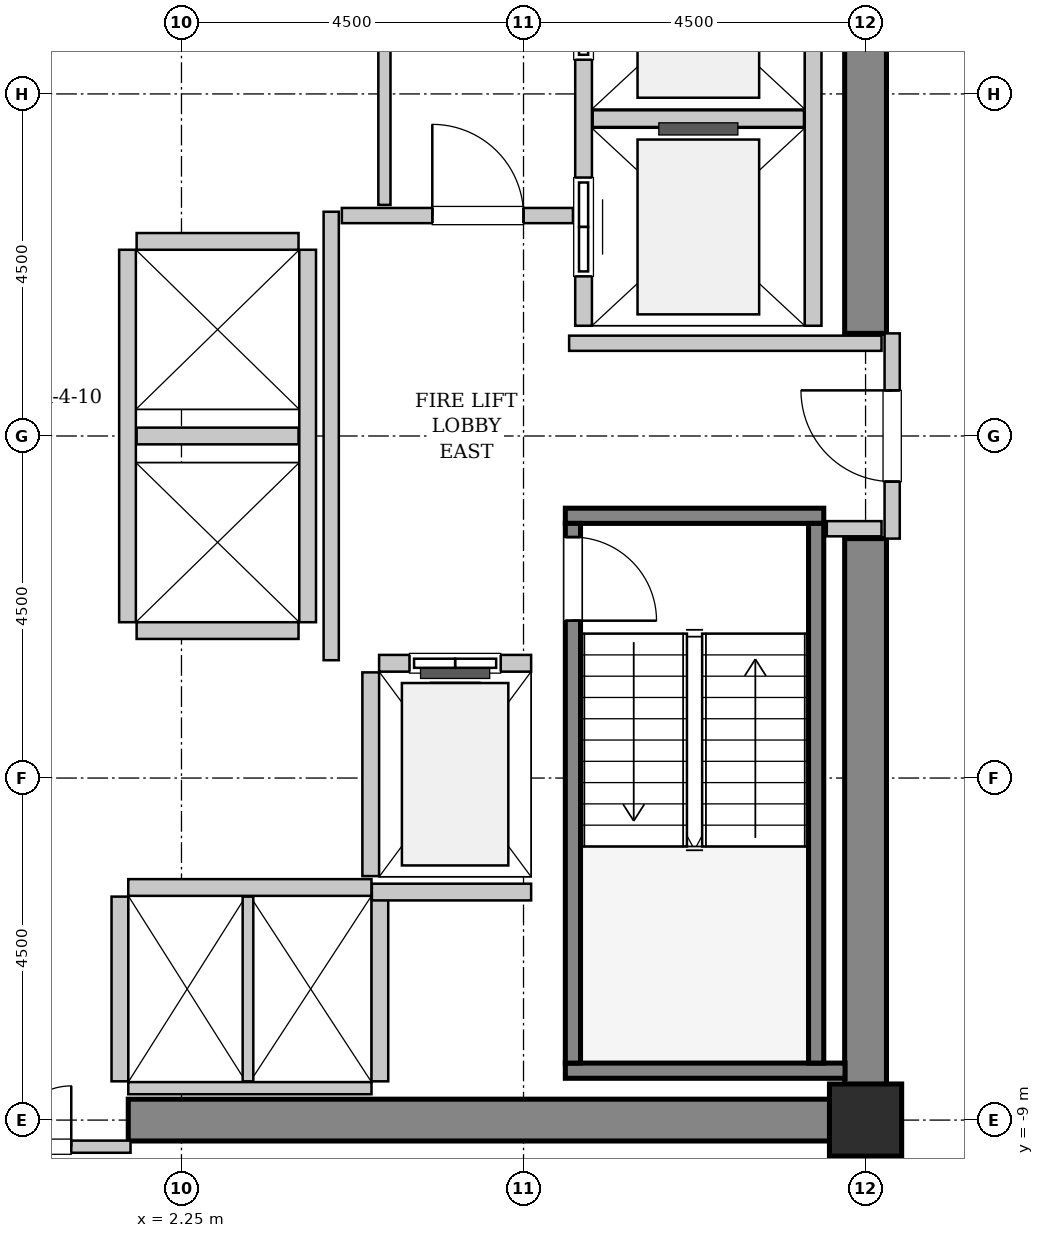
"""IFC4 building model, lengths in metres.
Left out: names, types, materials, properties, quantities, classifications, styles, units other than length and angle.
Written with IfcOpenShell. Run it as: python <this file> out.ifc"""

import sys

from ifc_helpers import new_model, si_unit, direction, frame, frame_2d, origin, origin_2d, place, context, subcontext, project, spatial, rectangle, hollow_rectangle, extrude, source, transform, mapped, element, fill, save


model = new_model("IFC4")
c1 = context("Model", 3, precision=1e-05, world=origin(), true_north=direction((0.0, 1.0)))
c2 = subcontext(c1, "Body", "Model", "MODEL_VIEW")
j1 = project(units=[si_unit("LENGTHUNIT", "METRE"), si_unit("PLANEANGLEUNIT", "RADIAN")], contexts=[c1])
p1 = place(None, origin())
s1 = spatial("IfcSite", under=j1, at=p1, CompositionType="ELEMENT")
p2 = place(p1, origin())
s2 = spatial("IfcBuilding", under=s1, at=p2, CompositionType="ELEMENT")
p3 = place(p2, frame((0.0, 0.0, 128.8)))
s3 = spatial("IfcBuildingStorey", under=s2, at=p3, CompositionType="ELEMENT", Elevation=128.8)
m1 = source(origin(), c2, "Body", "SweptSolid", [
    extrude(rectangle(XDim=9.975, YDim=0.55, at=frame_2d((4.987, 0.0))), origin(), (0.0, 0.0, 1.0), 3.8),
])
p4 = place(p3, frame((1.55, -9.0, 0.0), z_axis=(0.0, 0.0, 1.0), x_axis=(1.0, 0.0, 0.0)))
e1 = element("IfcWall", 1, at=p4, inside=s3, PredefinedType="SHEAR", context=c2, shape_type="MappedRepresentation", body=[
    mapped(m1, transform((0.0, 0.0, 0.0), x_axis=(1.0, 0.0, 0.0), y_axis=(0.0, 1.0, 0.0), z_axis=(0.0, 0.0, 1.0), scale=1.0)),
])
m2 = source(origin(), c2, "Body", "SweptSolid", [
    extrude(rectangle(XDim=7.375, YDim=0.55, at=frame_2d((3.688, 0.0))), origin(), (0.0, 0.0, 1.0), 3.8),
])
for number, where, z_axis, x_axis in (
    (2, (11.25, -8.725, 0.0), (0.0, 0.0, 1.0), (0.0, 1.0, 0.0)),
    (3, (11.25, 1.35, 0.0), (0.0, 0.0, 1.0), (0.0, 1.0, 0.0)),
):
    element("IfcWall", number, at=place(p3, frame(where, z_axis=z_axis, x_axis=x_axis)), inside=s3, PredefinedType="SHEAR", context=c2, shape_type="MappedRepresentation", body=[
        mapped(m2, transform((0.0, 0.0, 0.0), x_axis=(1.0, 0.0, 0.0), y_axis=(0.0, 1.0, 0.0), z_axis=(0.0, 0.0, 1.0), scale=1.0)),
    ])
m3 = source(origin(), c2, "Body", "SweptSolid", [
    extrude(hollow_rectangle(XDim=0.95, YDim=0.95, WallThickness=0.045, InnerFilletRadius=0.045, OuterFilletRadius=0.09, at=origin_2d()), origin(), (0.0, 0.0, 1.0), 3.8),
])
p5 = place(p3, frame((11.25, -9.0, 0.0), z_axis=(0.0, 0.0, 1.0), x_axis=(1.0, 0.0, 0.0)))
e4 = element("IfcColumn", 4, at=p5, inside=s3, PredefinedType="COLUMN", context=c2, shape_type="MappedRepresentation", body=[
    mapped(m3, transform((0.0, 0.0, 0.0), x_axis=(1.0, 0.0, 0.0), y_axis=(0.0, 1.0, 0.0), z_axis=(0.0, 0.0, 1.0), scale=1.0)),
])
m4 = source(origin(), c2, "Body", "SweptSolid", [
    extrude(rectangle(XDim=3.4, YDim=0.2, at=frame_2d((1.7, 0.0))), origin(), (0.0, 0.0, 1.0), 3.8),
])
p6 = place(p3, frame((7.3, -1.05, 0.0), z_axis=(0.0, 0.0, 1.0), x_axis=(1.0, 0.0, 0.0)))
e5 = element("IfcWall", 5, at=p6, inside=s3, PredefinedType="SOLIDWALL", context=c2, shape_type="MappedRepresentation", body=[
    mapped(m4, transform((0.0, 0.0, 0.0), x_axis=(1.0, 0.0, 0.0), y_axis=(0.0, 1.0, 0.0), z_axis=(0.0, 0.0, 1.0), scale=1.0)),
])
m5 = source(origin(), c2, "Body", "SweptSolid", [
    extrude(rectangle(XDim=3.68, YDim=0.2, at=frame_2d((1.84, 0.0))), origin(), (0.0, 0.0, 1.0), 3.8),
])
p7 = place(p3, frame((7.3, -8.35, 0.0), z_axis=(0.0, 0.0, 1.0), x_axis=(1.0, 0.0, 0.0)))
e6 = element("IfcWall", 6, at=p7, inside=s3, PredefinedType="SOLIDWALL", context=c2, shape_type="MappedRepresentation", body=[
    mapped(m5, transform((0.0, 0.0, 0.0), x_axis=(1.0, 0.0, 0.0), y_axis=(0.0, 1.0, 0.0), z_axis=(0.0, 0.0, 1.0), scale=1.0)),
])
m6 = source(origin(), c2, "Body", "SweptSolid", [
    extrude(rectangle(XDim=7.1, YDim=0.2, at=frame_2d((3.55, 0.0))), origin(), (0.0, 0.0, 1.0), 3.8),
])
p8 = place(p3, frame((7.4, -1.15, 0.0), z_axis=(0.0, 0.0, 1.0), x_axis=(0.0, -1.0, 0.0)))
e7 = element("IfcWall", 7, at=p8, inside=s3, PredefinedType="SOLIDWALL", context=c2, shape_type="MappedRepresentation", body=[
    mapped(m6, transform((0.0, 0.0, 0.0), x_axis=(1.0, 0.0, 0.0), y_axis=(0.0, 1.0, 0.0), z_axis=(0.0, 0.0, 1.0), scale=1.0)),
])
p9 = place(p8, frame((0.18, 0.0, 0.0)))
e8 = element("IfcOpeningElement", 8, at=p9, cuts=e7, PredefinedType="OPENING", context=c2, shape_type="SweptSolid", body=[
    extrude(rectangle(XDim=1.1, YDim=2.15, at=frame_2d((0.55, 1.075))), frame((0.0, 0.11, 0.0), z_axis=(0.0, -1.0, 0.0), x_axis=(1.0, 0.0, 0.0)), (0.0, 0.0, 1.0), 0.22),
])
p10 = place(p3, frame((10.6, -1.15, 0.0), z_axis=(0.0, 0.0, 1.0), x_axis=(0.0, -1.0, 0.0)))
e9 = element("IfcWall", 9, at=p10, inside=s3, PredefinedType="SOLIDWALL", context=c2, shape_type="MappedRepresentation", body=[
    mapped(m6, transform((0.0, 0.0, 0.0), x_axis=(1.0, 0.0, 0.0), y_axis=(0.0, 1.0, 0.0), z_axis=(0.0, 0.0, 1.0), scale=1.0)),
])
m7 = source(origin(), c2, "Body", "SweptSolid", [
    extrude(rectangle(XDim=2.0, YDim=0.22, at=frame_2d((1.0, 0.0))), origin(), (0.0, 0.0, 1.0), 3.535),
])
p11 = place(p3, frame((6.85, -2.99, 0.0), z_axis=(0.0, 0.0, 1.0), x_axis=(-1.0, 0.0, 0.0)))
e10 = element("IfcWall", 10, at=p11, inside=s3, PredefinedType="SOLIDWALL", context=c2, shape_type="MappedRepresentation", body=[
    mapped(m7, transform((0.0, 0.0, 0.0), x_axis=(1.0, 0.0, 0.0), y_axis=(0.0, 1.0, 0.0), z_axis=(0.0, 0.0, 1.0), scale=1.0)),
])
p12 = place(p11, frame((0.4, 0.0, 0.0)))
e11 = element("IfcOpeningElement", 11, at=p12, cuts=e10, PredefinedType="OPENING", context=c2, shape_type="SweptSolid", body=[
    extrude(rectangle(XDim=1.2, YDim=2.2, at=frame_2d((0.6, 1.1))), frame((0.0, 0.12, 0.0), z_axis=(0.0, -1.0, 0.0), x_axis=(1.0, 0.0, 0.0)), (0.0, 0.0, 1.0), 0.24),
])
m8 = source(origin(), c2, "Body", "SweptSolid", [
    extrude(rectangle(XDim=2.68, YDim=0.22, at=frame_2d((1.34, 0.0))), origin(), (0.0, 0.0, 1.0), 3.535),
])
p13 = place(p3, frame((4.74, -3.11, 0.0), z_axis=(0.0, 0.0, 1.0), x_axis=(0.0, -1.0, 0.0)))
e12 = element("IfcWall", 12, at=p13, inside=s3, PredefinedType="SOLIDWALL", context=c2, shape_type="MappedRepresentation", body=[
    mapped(m8, transform((0.0, 0.0, 0.0), x_axis=(1.0, 0.0, 0.0), y_axis=(0.0, 1.0, 0.0), z_axis=(0.0, 0.0, 1.0), scale=1.0)),
])
m9 = source(origin(), c2, "Body", "SweptSolid", [
    extrude(rectangle(XDim=5.45, YDim=0.22, at=frame_2d((2.725, 0.0))), origin(), (0.0, 0.0, 1.0), 3.535),
])
p14 = place(p3, frame((7.54, 6.9, 0.0), z_axis=(0.0, 0.0, 1.0), x_axis=(0.0, -1.0, 0.0)))
e13 = element("IfcWall", 13, at=p14, inside=s3, PredefinedType="SOLIDWALL", context=c2, shape_type="MappedRepresentation", body=[
    mapped(m9, transform((0.0, 0.0, 0.0), x_axis=(1.0, 0.0, 0.0), y_axis=(0.0, 1.0, 0.0), z_axis=(0.0, 0.0, 1.0), scale=1.0)),
])
p15 = place(p14, frame((3.5, 0.0, 0.0)))
e14 = element("IfcOpeningElement", 14, at=p15, cuts=e13, PredefinedType="OPENING", context=c2, shape_type="SweptSolid", body=[
    extrude(rectangle(XDim=1.3, YDim=2.3, at=frame_2d((0.65, 1.15))), frame((0.0, 0.12, 0.0), z_axis=(0.0, -1.0, 0.0), x_axis=(1.0, 0.0, 0.0)), (0.0, 0.0, 1.0), 0.24),
])
p16 = place(p14, frame((0.65, 0.0, 0.0)))
e15 = element("IfcOpeningElement", 15, at=p16, cuts=e13, PredefinedType="OPENING", context=c2, shape_type="SweptSolid", body=[
    extrude(rectangle(XDim=1.3, YDim=2.3, at=frame_2d((0.65, 1.15))), frame((0.0, 0.12, 0.0), z_axis=(0.0, -1.0, 0.0), x_axis=(1.0, 0.0, 0.0)), (0.0, 0.0, 1.0), 0.24),
])
p17 = place(p3, frame((10.56, 1.45, 0.0), z_axis=(0.0, 0.0, 1.0), x_axis=(0.0, 1.0, 0.0)))
e16 = element("IfcWall", 16, at=p17, inside=s3, PredefinedType="SOLIDWALL", context=c2, shape_type="MappedRepresentation", body=[
    mapped(m9, transform((0.0, 0.0, 0.0), x_axis=(1.0, 0.0, 0.0), y_axis=(0.0, 1.0, 0.0), z_axis=(0.0, 0.0, 1.0), scale=1.0)),
])
m10 = source(origin(), c2, "Body", "SweptSolid", [
    extrude(rectangle(XDim=2.78, YDim=0.22, at=frame_2d((1.39, 0.0))), origin(), (0.0, 0.0, 1.0), 3.535),
])
p18 = place(p3, frame((7.66, 4.175, 0.0), z_axis=(0.0, 0.0, 1.0), x_axis=(1.0, 0.0, 0.0)))
e17 = element("IfcWall", 17, at=p18, inside=s3, PredefinedType="SOLIDWALL", context=c2, shape_type="MappedRepresentation", body=[
    mapped(m10, transform((0.0, 0.0, 0.0), x_axis=(1.0, 0.0, 0.0), y_axis=(0.0, 1.0, 0.0), z_axis=(0.0, 0.0, 1.0), scale=1.0)),
])
m11 = source(origin(), c2, "Body", "SweptSolid", [
    extrude(rectangle(XDim=3.2, YDim=0.22, at=frame_2d((1.6, 0.0))), origin(), (0.0, 0.0, 1.0), 3.535),
])
p19 = place(p3, frame((4.75, -5.94, 0.0), z_axis=(0.0, 0.0, 1.0), x_axis=(-1.0, 0.0, 0.0)))
e18 = element("IfcWall", 18, at=p19, inside=s3, PredefinedType="SOLIDWALL", context=c2, shape_type="MappedRepresentation", body=[
    mapped(m11, transform((0.0, 0.0, 0.0), x_axis=(1.0, 0.0, 0.0), y_axis=(0.0, 1.0, 0.0), z_axis=(0.0, 0.0, 1.0), scale=1.0)),
])
m12 = source(origin(), c2, "Body", "SweptSolid", [
    extrude(rectangle(XDim=3.2, YDim=0.16, at=frame_2d((1.6, 0.0))), origin(), (0.0, 0.0, 1.0), 2.425),
])
p20 = place(p3, frame((1.55, -8.58, 0.0), z_axis=(0.0, 0.0, 1.0), x_axis=(1.0, 0.0, 0.0)))
e19 = element("IfcWall", 19, at=p20, inside=s3, PredefinedType="PARTITIONING", context=c2, shape_type="MappedRepresentation", body=[
    mapped(m12, transform((0.0, 0.0, 0.0), x_axis=(1.0, 0.0, 0.0), y_axis=(0.0, 1.0, 0.0), z_axis=(0.0, 0.0, 1.0), scale=1.0)),
])
m13 = source(origin(), c2, "Body", "SweptSolid", [
    extrude(rectangle(XDim=2.43, YDim=0.22, at=frame_2d((1.215, 0.0))), origin(), (0.0, 0.0, 1.0), 3.535),
])
p21 = place(p3, frame((1.44, -6.06, 0.0), z_axis=(0.0, 0.0, 1.0), x_axis=(0.0, -1.0, 0.0)))
e20 = element("IfcWall", 20, at=p21, inside=s3, PredefinedType="SOLIDWALL", context=c2, shape_type="MappedRepresentation", body=[
    mapped(m13, transform((0.0, 0.0, 0.0), x_axis=(1.0, 0.0, 0.0), y_axis=(0.0, 1.0, 0.0), z_axis=(0.0, 0.0, 1.0), scale=1.0)),
])
m14 = source(origin(), c2, "Body", "SweptSolid", [
    extrude(rectangle(XDim=2.43, YDim=0.14, at=frame_2d((1.215, 0.0))), origin(), (0.0, 0.0, 1.0), 3.535),
])
p22 = place(p3, frame((3.125, -8.49, 0.0), z_axis=(0.0, 0.0, 1.0), x_axis=(0.0, 1.0, 0.0)))
e21 = element("IfcWall", 21, at=p22, inside=s3, PredefinedType="PARTITIONING", context=c2, shape_type="MappedRepresentation", body=[
    mapped(m14, transform((0.0, 0.0, 0.0), x_axis=(1.0, 0.0, 0.0), y_axis=(0.0, 1.0, 0.0), z_axis=(0.0, 0.0, 1.0), scale=1.0)),
])
p23 = place(p3, frame((4.86, -8.49, 0.0), z_axis=(0.0, 0.0, 1.0), x_axis=(0.0, 1.0, 0.0)))
e22 = element("IfcWall", 22, at=p23, inside=s3, PredefinedType="SOLIDWALL", context=c2, shape_type="MappedRepresentation", body=[
    mapped(m13, transform((0.0, 0.0, 0.0), x_axis=(1.0, 0.0, 0.0), y_axis=(0.0, 1.0, 0.0), z_axis=(0.0, 0.0, 1.0), scale=1.0)),
])
m15 = source(origin(), c2, "Body", "SweptSolid", [
    extrude(rectangle(XDim=4.9, YDim=0.22, at=frame_2d((2.45, 0.0))), origin(), (0.0, 0.0, 1.0), 3.535),
])
for number, where, z_axis, x_axis in (
    (23, (1.54, 2.45, 0.0), (0.0, 0.0, 1.0), (0.0, -1.0, 0.0)),
    (24, (3.91, -2.45, 0.0), (0.0, 0.0, 1.0), (0.0, 1.0, 0.0)),
):
    element("IfcWall", number, at=place(p3, frame(where, z_axis=z_axis, x_axis=x_axis)), inside=s3, PredefinedType="SOLIDWALL", context=c2, shape_type="MappedRepresentation", body=[
        mapped(m15, transform((0.0, 0.0, 0.0), x_axis=(1.0, 0.0, 0.0), y_axis=(0.0, 1.0, 0.0), z_axis=(0.0, 0.0, 1.0), scale=1.0)),
    ])
m16 = source(origin(), c2, "Body", "SweptSolid", [
    extrude(rectangle(XDim=2.13, YDim=0.22, at=frame_2d((1.065, 0.0))), origin(), (0.0, 0.0, 1.0), 3.535),
])
for number, where, z_axis, x_axis in (
    (25, (1.66, -2.56, 0.0), (0.0, 0.0, 1.0), (1.0, 0.0, 0.0)),
    (26, (1.66, 0.0, 0.0), (0.0, 0.0, 1.0), (1.0, 0.0, 0.0)),
    (27, (3.79, 2.56, 0.0), (0.0, 0.0, 1.0), (-1.0, 0.0, 0.0)),
):
    element("IfcWall", number, at=place(p3, frame(where, z_axis=z_axis, x_axis=x_axis)), inside=s3, PredefinedType="SOLIDWALL", context=c2, shape_type="MappedRepresentation", body=[
        mapped(m16, transform((0.0, 0.0, 0.0), x_axis=(1.0, 0.0, 0.0), y_axis=(0.0, 1.0, 0.0), z_axis=(0.0, 0.0, 1.0), scale=1.0)),
    ])
m17 = source(origin(), c2, "Body", "SweptSolid", [
    extrude(rectangle(XDim=2.095, YDim=0.22, at=frame_2d((1.048, 0.0))), origin(), (0.0, 0.0, 1.0), 3.535),
])
p24 = place(p3, frame((4.755, -6.0, 0.0), z_axis=(0.0, 0.0, 1.0), x_axis=(1.0, 0.0, 0.0)))
e28 = element("IfcWall", 28, at=p24, inside=s3, PredefinedType="SOLIDWALL", context=c2, shape_type="MappedRepresentation", body=[
    mapped(m17, transform((0.0, 0.0, 0.0), x_axis=(1.0, 0.0, 0.0), y_axis=(0.0, 1.0, 0.0), z_axis=(0.0, 0.0, 1.0), scale=1.0)),
])
m18 = source(origin(), c2, "Body", "SweptSolid", [
    extrude(rectangle(XDim=2.7, YDim=0.2, at=frame_2d((1.35, 0.0))), origin(), (0.0, 0.0, 1.0), 2.425),
])
p25 = place(p3, frame((11.6, -1.35, 0.0), z_axis=(0.0, 0.0, 1.0), x_axis=(0.0, 1.0, 0.0)))
e29 = element("IfcWall", 29, at=p25, inside=s3, PredefinedType="PARTITIONING", context=c2, shape_type="MappedRepresentation", body=[
    mapped(m18, transform((0.0, 0.0, 0.0), x_axis=(1.0, 0.0, 0.0), y_axis=(0.0, 1.0, 0.0), z_axis=(0.0, 0.0, 1.0), scale=1.0)),
])
p26 = place(p25, frame((0.75, 0.0, 0.0)))
e30 = element("IfcOpeningElement", 30, at=p26, cuts=e29, PredefinedType="OPENING", context=c2, shape_type="SweptSolid", body=[
    extrude(rectangle(XDim=1.2, YDim=2.15, at=frame_2d((0.6, 1.075))), frame((0.0, 0.11, 0.0), z_axis=(0.0, -1.0, 0.0), x_axis=(1.0, 0.0, 0.0)), (0.0, 0.0, 1.0), 0.22),
])
m19 = source(origin(), c2, "Body", "SweptSolid", [
    extrude(rectangle(XDim=5.9, YDim=0.2, at=frame_2d((2.95, 0.0))), origin(), (0.0, 0.0, 1.0), 3.535),
])
p27 = place(p3, frame((4.22, -2.95, 0.0), z_axis=(0.0, 0.0, 1.0), x_axis=(0.0, 1.0, 0.0)))
e31 = element("IfcWall", 31, at=p27, inside=s3, PredefinedType="PARTITIONING", context=c2, shape_type="MappedRepresentation", body=[
    mapped(m19, transform((0.0, 0.0, 0.0), x_axis=(1.0, 0.0, 0.0), y_axis=(0.0, 1.0, 0.0), z_axis=(0.0, 0.0, 1.0), scale=1.0)),
])
m20 = source(origin(), c2, "Body", "SweptSolid", [
    extrude(rectangle(XDim=3.04, YDim=0.2, at=frame_2d((1.52, 0.0))), origin(), (0.0, 0.0, 1.0), 3.535),
])
p28 = place(p3, frame((4.36, 2.9, 0.0), z_axis=(0.0, 0.0, 1.0), x_axis=(1.0, 0.0, 0.0)))
e32 = element("IfcWall", 32, at=p28, inside=s3, PredefinedType="PARTITIONING", context=c2, shape_type="MappedRepresentation", body=[
    mapped(m20, transform((0.0, 0.0, 0.0), x_axis=(1.0, 0.0, 0.0), y_axis=(0.0, 1.0, 0.0), z_axis=(0.0, 0.0, 1.0), scale=1.0)),
])
p29 = place(p28, frame((1.19, 0.0, 0.0)))
e33 = element("IfcOpeningElement", 33, at=p29, cuts=e32, PredefinedType="OPENING", context=c2, shape_type="SweptSolid", body=[
    extrude(rectangle(XDim=1.2, YDim=2.15, at=frame_2d((0.6, 1.075))), frame((0.0, 0.11, 0.0), z_axis=(0.0, -1.0, 0.0), x_axis=(1.0, 0.0, 0.0)), (0.0, 0.0, 1.0), 0.22),
])
m21 = source(origin(), c2, "Body", "SweptSolid", [
    extrude(rectangle(XDim=4.11, YDim=0.2, at=frame_2d((2.055, 0.0))), origin(), (0.0, 0.0, 1.0), 3.535),
])
p30 = place(p3, frame((7.35, 1.22, 0.0), z_axis=(0.0, 0.0, 1.0), x_axis=(1.0, 0.0, 0.0)))
e34 = element("IfcWall", 34, at=p30, inside=s3, PredefinedType="PARTITIONING", context=c2, shape_type="MappedRepresentation", body=[
    mapped(m21, transform((0.0, 0.0, 0.0), x_axis=(1.0, 0.0, 0.0), y_axis=(0.0, 1.0, 0.0), z_axis=(0.0, 0.0, 1.0), scale=1.0)),
])
m22 = source(origin(), c2, "Body", "SweptSolid", [
    extrude(rectangle(XDim=0.72, YDim=0.2, at=frame_2d((0.36, 0.0))), origin(), (0.0, 0.0, 1.0), 3.535),
])
p31 = place(p3, frame((10.74, -1.22, 0.0), z_axis=(0.0, 0.0, 1.0), x_axis=(1.0, 0.0, 0.0)))
e35 = element("IfcWall", 35, at=p31, inside=s3, PredefinedType="PARTITIONING", context=c2, shape_type="MappedRepresentation", body=[
    mapped(m22, transform((0.0, 0.0, 0.0), x_axis=(1.0, 0.0, 0.0), y_axis=(0.0, 1.0, 0.0), z_axis=(0.0, 0.0, 1.0), scale=1.0)),
])
m23 = source(origin(), c2, "Body", "SweptSolid", [
    extrude(rectangle(XDim=3.16, YDim=0.16, at=frame_2d((1.58, 0.0))), origin(), (0.0, 0.0, 1.0), 2.425),
])
p32 = place(p3, frame((-1.58, -9.35, 0.0), z_axis=(0.0, 0.0, 1.0), x_axis=(1.0, 0.0, 0.0)))
e36 = element("IfcWall", 36, at=p32, inside=s3, PredefinedType="PARTITIONING", context=c2, shape_type="MappedRepresentation", body=[
    mapped(m23, transform((0.0, 0.0, 0.0), x_axis=(1.0, 0.0, 0.0), y_axis=(0.0, 1.0, 0.0), z_axis=(0.0, 0.0, 1.0), scale=1.0)),
])
p33 = place(p32, frame((0.78, 0.0, 0.0)))
e37 = element("IfcOpeningElement", 37, at=p33, cuts=e36, PredefinedType="OPENING", context=c2, shape_type="SweptSolid", body=[
    extrude(rectangle(XDim=1.6, YDim=2.3, at=frame_2d((0.8, 1.15))), frame((0.0, 0.09, 0.0), z_axis=(0.0, -1.0, 0.0), x_axis=(1.0, 0.0, 0.0)), (0.0, 0.0, 1.0), 0.18),
])
m24 = source(origin(), c2, "Body", "SweptSolid", [
    extrude(rectangle(XDim=3.015, YDim=0.16, at=frame_2d((1.507, 0.0))), origin(), (0.0, 0.0, 1.0), 3.535),
])
p34 = place(p3, frame((4.92, 3.04, 0.0), z_axis=(0.0, 0.0, 1.0), x_axis=(0.0, 1.0, 0.0)))
e38 = element("IfcWall", 38, at=p34, inside=s3, PredefinedType="PARTITIONING", context=c2, shape_type="MappedRepresentation", body=[
    mapped(m24, transform((0.0, 0.0, 0.0), x_axis=(1.0, 0.0, 0.0), y_axis=(0.0, 1.0, 0.0), z_axis=(0.0, 0.0, 1.0), scale=1.0)),
])
m25 = source(origin(), c2, "Body", "SweptSolid", [
    extrude(rectangle(XDim=1.1, YDim=2.15, at=frame_2d((0.55, 1.075))), frame((0.0, 0.025, 0.0), z_axis=(0.0, -1.0, 0.0), x_axis=(1.0, 0.0, 0.0)), (0.0, 0.0, 1.0), 0.05),
])
p35 = place(p9, origin())
e39 = element("IfcDoor", 39, at=p35, inside=s3, OperationType="SINGLE_SWING_RIGHT", PredefinedType="DOOR", context=c2, shape_type="MappedRepresentation", body=[
    mapped(m25, transform((0.0, 0.0, 0.0), x_axis=(1.0, 0.0, 0.0), y_axis=(0.0, 1.0, 0.0), z_axis=(0.0, 0.0, 1.0), scale=1.0)),
])
fill(e8, e39)
m26 = source(origin(), c2, "Body", "SweptSolid", [
    extrude(rectangle(XDim=1.2, YDim=2.2, at=frame_2d((0.6, 1.1))), frame((0.0, 0.025, 0.0), z_axis=(0.0, -1.0, 0.0), x_axis=(1.0, 0.0, 0.0)), (0.0, 0.0, 1.0), 0.05),
])
p36 = place(p12, origin())
e40 = element("IfcDoor", 40, at=p36, inside=s3, OperationType="SLIDING_TO_LEFT", PredefinedType="DOOR", context=c2, shape_type="MappedRepresentation", body=[
    mapped(m26, transform((0.0, 0.0, 0.0), x_axis=(1.0, 0.0, 0.0), y_axis=(0.0, 1.0, 0.0), z_axis=(0.0, 0.0, 1.0), scale=1.0)),
])
fill(e11, e40)
m27 = source(origin(), c2, "Body", "SweptSolid", [
    extrude(rectangle(XDim=1.3, YDim=2.3, at=frame_2d((0.65, 1.15))), frame((0.0, 0.025, 0.0), z_axis=(0.0, -1.0, 0.0), x_axis=(1.0, 0.0, 0.0)), (0.0, 0.0, 1.0), 0.05),
])
p37 = place(p15, origin())
e41 = element("IfcDoor", 41, at=p37, inside=s3, OperationType="SLIDING_TO_RIGHT", PredefinedType="DOOR", context=c2, shape_type="MappedRepresentation", body=[
    mapped(m27, transform((0.0, 0.0, 0.0), x_axis=(1.0, 0.0, 0.0), y_axis=(0.0, 1.0, 0.0), z_axis=(0.0, 0.0, 1.0), scale=1.0)),
])
fill(e14, e41)
p38 = place(p16, origin())
e42 = element("IfcDoor", 42, at=p38, inside=s3, OperationType="SLIDING_TO_RIGHT", PredefinedType="DOOR", context=c2, shape_type="MappedRepresentation", body=[
    mapped(m27, transform((0.0, 0.0, 0.0), x_axis=(1.0, 0.0, 0.0), y_axis=(0.0, 1.0, 0.0), z_axis=(0.0, 0.0, 1.0), scale=1.0)),
])
fill(e15, e42)
m28 = source(origin(), c2, "Body", "SweptSolid", [
    extrude(rectangle(XDim=1.2, YDim=2.15, at=frame_2d((0.6, 1.075))), frame((0.0, 0.025, 0.0), z_axis=(0.0, -1.0, 0.0), x_axis=(1.0, 0.0, 0.0)), (0.0, 0.0, 1.0), 0.05),
])
p39 = place(p26, origin())
e43 = element("IfcDoor", 43, at=p39, inside=s3, OperationType="SINGLE_SWING_RIGHT", PredefinedType="DOOR", context=c2, shape_type="MappedRepresentation", body=[
    mapped(m28, transform((0.0, 0.0, 0.0), x_axis=(1.0, 0.0, 0.0), y_axis=(0.0, 1.0, 0.0), z_axis=(0.0, 0.0, 1.0), scale=1.0)),
])
fill(e30, e43)
p40 = place(p29, origin())
e44 = element("IfcDoor", 44, at=p40, inside=s3, OperationType="SINGLE_SWING_LEFT", PredefinedType="DOOR", context=c2, shape_type="MappedRepresentation", body=[
    mapped(m28, transform((0.0, 0.0, 0.0), x_axis=(1.0, 0.0, 0.0), y_axis=(0.0, 1.0, 0.0), z_axis=(0.0, 0.0, 1.0), scale=1.0)),
])
fill(e33, e44)
m29 = source(origin(), c2, "Body", "SweptSolid", [
    extrude(rectangle(XDim=1.6, YDim=2.3, at=frame_2d((0.8, 1.15))), frame((0.0, 0.025, 0.0), z_axis=(0.0, -1.0, 0.0), x_axis=(1.0, 0.0, 0.0)), (0.0, 0.0, 1.0), 0.05),
])
p41 = place(p33, origin())
e45 = element("IfcDoor", 45, at=p41, inside=s3, OperationType="DOUBLE_DOOR_SINGLE_SWING", PredefinedType="DOOR", context=c2, shape_type="MappedRepresentation", body=[
    mapped(m29, transform((0.0, 0.0, 0.0), x_axis=(1.0, 0.0, 0.0), y_axis=(0.0, 1.0, 0.0), z_axis=(0.0, 0.0, 1.0), scale=1.0)),
])
fill(e37, e45)
save(model, sys.argv[1])
